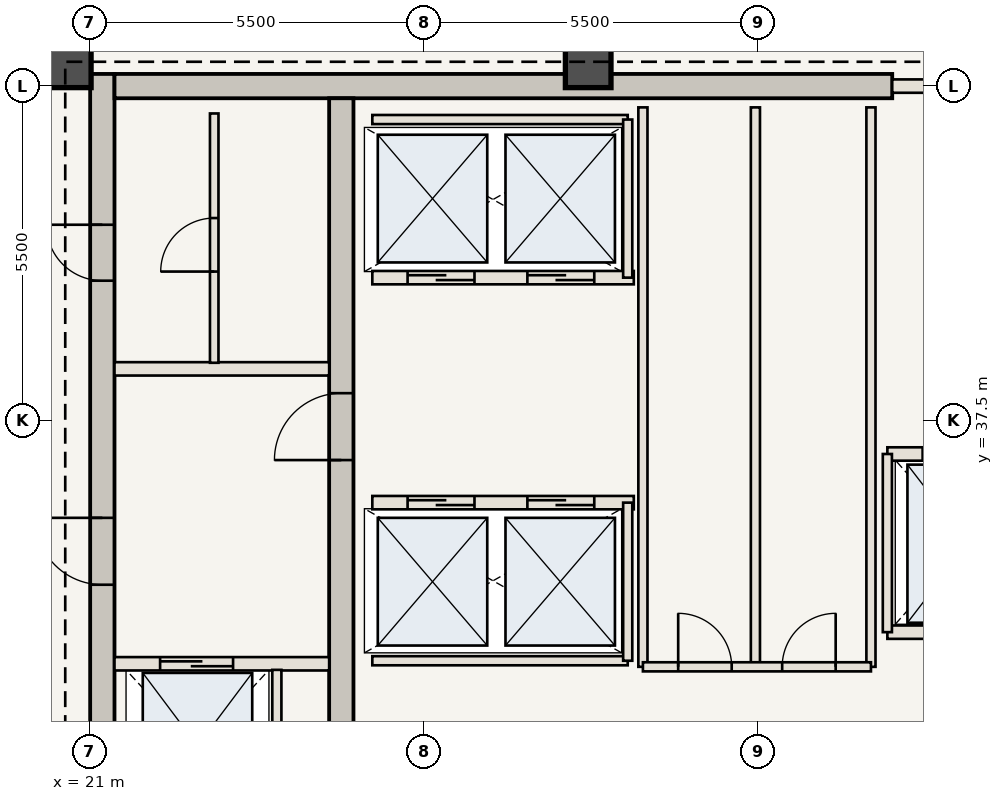
"""IFC4 building model, lengths in metres.
Left out: names, types, materials, properties, quantities, classifications, styles, units other than length and angle.
Written with IfcOpenShell. Run it as: python <this file> out.ifc"""

import sys

from ifc_helpers import new_model, si_unit, direction, frame, frame_2d, origin, origin_2d, place, context, subcontext, project, spatial, rectangle, extrude, element, fill, save


model = new_model("IFC4")
c1 = context("Model", 3, precision=1e-05, world=origin(), true_north=direction((0.0, 1.0)))
c2 = subcontext(c1, "Body", "Model", "MODEL_VIEW")
j1 = project(units=[si_unit("LENGTHUNIT", "METRE"), si_unit("PLANEANGLEUNIT", "RADIAN")], contexts=[c1])
p1 = place(None, origin())
s1 = spatial("IfcSite", under=j1, at=p1, CompositionType="ELEMENT")
p2 = place(p1, origin())
s2 = spatial("IfcBuilding", under=s1, at=p2, CompositionType="ELEMENT")
p3 = place(p2, frame((0.0, 0.0, 277.55)))
s3 = spatial("IfcBuildingStorey", under=s2, at=p3, CompositionType="ELEMENT", Elevation=277.55)
p4 = place(p3, frame((21.21, 30.6, 0.0), z_axis=(0.0, 0.0, 1.0), x_axis=(0.0, 1.0, 0.0)))
e1 = element("IfcWall", 1, at=p4, inside=s3, PredefinedType="SHEAR", context=c2, shape_type="SweptSolid", body=[
    extrude(rectangle(XDim=12.6, YDim=0.4, at=frame_2d((6.3, 0.0))), origin(), (0.0, 0.0, 1.0), 3.85),
])
p5 = place(p4, frame((4.2, 0.0, 0.0)))
e2 = element("IfcOpeningElement", 2, at=p5, cuts=e1, PredefinedType="OPENING", context=c2, shape_type="SweptSolid", body=[
    extrude(rectangle(XDim=1.1, YDim=2.15, at=frame_2d((0.55, 1.075))), frame((0.0, 0.21, 0.0), z_axis=(0.0, -1.0, 0.0), x_axis=(1.0, 0.0, 0.0)), (0.0, 0.0, 1.0), 0.42),
])
p6 = place(p4, frame((9.2, 0.0, 0.0)))
e3 = element("IfcOpeningElement", 3, at=p6, cuts=e1, PredefinedType="OPENING", context=c2, shape_type="SweptSolid", body=[
    extrude(rectangle(XDim=0.92, YDim=2.1, at=frame_2d((0.46, 1.05))), frame((0.0, 0.21, 0.0), z_axis=(0.0, -1.0, 0.0), x_axis=(1.0, 0.0, 0.0)), (0.0, 0.0, 1.0), 0.42),
])
p7 = place(p3, frame((21.41, 43.0, 0.0), z_axis=(0.0, 0.0, 1.0), x_axis=(1.0, 0.0, 0.0)))
e4 = element("IfcWall", 4, at=p7, inside=s3, PredefinedType="SHEAR", context=c2, shape_type="SweptSolid", body=[
    extrude(rectangle(XDim=12.79, YDim=0.4, at=frame_2d((6.395, 0.0))), origin(), (0.0, 0.0, 1.0), 3.85),
])
p8 = place(p3, frame((25.14, 30.6, 0.0), z_axis=(0.0, 0.0, 1.0), x_axis=(0.0, 1.0, 0.0)))
e5 = element("IfcWall", 5, at=p8, inside=s3, PredefinedType="SHEAR", context=c2, shape_type="SweptSolid", body=[
    extrude(rectangle(XDim=12.2, YDim=0.4, at=frame_2d((6.1, 0.0))), origin(), (0.0, 0.0, 1.0), 3.85),
])
p9 = place(p8, frame((6.25, 0.0, 0.0)))
e6 = element("IfcOpeningElement", 6, at=p9, cuts=e5, PredefinedType="OPENING", context=c2, shape_type="SweptSolid", body=[
    extrude(rectangle(XDim=1.1, YDim=2.15, at=frame_2d((0.55, 1.075))), frame((0.0, 0.21, 0.0), z_axis=(0.0, -1.0, 0.0), x_axis=(1.0, 0.0, 0.0)), (0.0, 0.0, 1.0), 0.42),
])
for number, where, z_axis, x_axis in (
    (7, (29.2, 43.35, 0.0), (0.0, 0.0, 1.0), (1.0, 0.0, 0.0)),
    (8, (20.65, 43.35, 0.0), (0.0, 0.0, 1.0), (1.0, 0.0, 0.0)),
):
    element("IfcColumn", number, at=place(p3, frame(where, z_axis=z_axis, x_axis=x_axis)), inside=s3, PredefinedType="COLUMN", context=c2, shape_type="SweptSolid", body=[
        extrude(rectangle(XDim=0.75, YDim=0.75, at=origin_2d()), origin(), (0.0, 0.0, 1.0), 3.85),
    ])
p10 = place(p3, frame((21.41, 33.5, 0.0), z_axis=(0.0, 0.0, 1.0), x_axis=(1.0, 0.0, 0.0)))
e9 = element("IfcWall", 9, at=p10, inside=s3, PredefinedType="STANDARD", context=c2, shape_type="SweptSolid", body=[
    extrude(rectangle(XDim=3.53, YDim=0.22, at=frame_2d((1.765, 0.0))), origin(), (0.0, 0.0, 1.0), 3.685),
])
p11 = place(p10, frame((0.75, 0.0, 0.0)))
e10 = element("IfcOpeningElement", 10, at=p11, cuts=e9, PredefinedType="OPENING", context=c2, shape_type="SweptSolid", body=[
    extrude(rectangle(XDim=1.2, YDim=2.2, at=frame_2d((0.6, 1.1))), frame((0.0, 0.12, 0.0), z_axis=(0.0, -1.0, 0.0), x_axis=(1.0, 0.0, 0.0)), (0.0, 0.0, 1.0), 0.24),
])
p12 = place(p3, frame((24.08, 30.75, 0.0), z_axis=(0.0, 0.0, 1.0), x_axis=(0.0, 1.0, 0.0)))
e11 = element("IfcWall", 11, at=p12, inside=s3, PredefinedType="STANDARD", context=c2, shape_type="SweptSolid", body=[
    extrude(rectangle(XDim=2.65, YDim=0.15, at=frame_2d((1.325, 0.0))), origin(), (0.0, 0.0, 1.0), 3.685),
])
p13 = place(p3, frame((21.41, 38.35, 0.0), z_axis=(0.0, 0.0, 1.0), x_axis=(1.0, 0.0, 0.0)))
e12 = element("IfcWall", 12, at=p13, inside=s3, PredefinedType="STANDARD", context=c2, shape_type="SweptSolid", body=[
    extrude(rectangle(XDim=3.53, YDim=0.22, at=frame_2d((1.765, 0.0))), origin(), (0.0, 0.0, 1.0), 3.685),
])
p14 = place(p3, frame((23.05, 38.45, 0.0), z_axis=(0.0, 0.0, 1.0), x_axis=(0.0, 1.0, 0.0)))
e13 = element("IfcWall", 13, at=p14, inside=s3, PredefinedType="STANDARD", context=c2, shape_type="SweptSolid", body=[
    extrude(rectangle(XDim=4.1, YDim=0.14, at=frame_2d((2.05, 0.0))), origin(), (0.0, 0.0, 1.0), 3.685),
])
p15 = place(p14, frame((1.5, 0.0, 0.0)))
e14 = element("IfcOpeningElement", 14, at=p15, cuts=e13, PredefinedType="OPENING", context=c2, shape_type="SweptSolid", body=[
    extrude(rectangle(XDim=0.88, YDim=2.1, at=frame_2d((0.44, 1.05))), frame((0.0, 0.08, 0.0), z_axis=(0.0, -1.0, 0.0), x_axis=(1.0, 0.0, 0.0)), (0.0, 0.0, 1.0), 0.16),
])
p16 = place(p3, frame((25.65, 36.15, 0.0), z_axis=(0.0, 0.0, 1.0), x_axis=(1.0, 0.0, 0.0)))
e15 = element("IfcWall", 15, at=p16, inside=s3, PredefinedType="STANDARD", context=c2, shape_type="SweptSolid", body=[
    extrude(rectangle(XDim=4.3, YDim=0.22, at=frame_2d((2.15, 0.0))), origin(), (0.0, 0.0, 1.0), 3.685),
])
p17 = place(p16, frame((0.58, 0.0, 0.0)))
e16 = element("IfcOpeningElement", 16, at=p17, cuts=e15, PredefinedType="OPENING", context=c2, shape_type="SweptSolid", body=[
    extrude(rectangle(XDim=1.1, YDim=2.15, at=frame_2d((0.55, 1.075))), frame((0.0, 0.12, 0.0), z_axis=(0.0, -1.0, 0.0), x_axis=(1.0, 0.0, 0.0)), (0.0, 0.0, 1.0), 0.24),
])
p18 = place(p16, frame((2.55, 0.0, 0.0)))
e17 = element("IfcOpeningElement", 17, at=p18, cuts=e15, PredefinedType="OPENING", context=c2, shape_type="SweptSolid", body=[
    extrude(rectangle(XDim=1.1, YDim=2.15, at=frame_2d((0.55, 1.075))), frame((0.0, 0.12, 0.0), z_axis=(0.0, -1.0, 0.0), x_axis=(1.0, 0.0, 0.0)), (0.0, 0.0, 1.0), 0.24),
])
p19 = place(p3, frame((25.65, 33.55, 0.0), z_axis=(0.0, 0.0, 1.0), x_axis=(1.0, 0.0, 0.0)))
e18 = element("IfcWall", 18, at=p19, inside=s3, PredefinedType="STANDARD", context=c2, shape_type="SweptSolid", body=[
    extrude(rectangle(XDim=4.2, YDim=0.15, at=frame_2d((2.1, 0.0))), origin(), (0.0, 0.0, 1.0), 3.685),
])
p20 = place(p3, frame((29.85, 33.55, 0.0), z_axis=(0.0, 0.0, 1.0), x_axis=(0.0, 1.0, 0.0)))
e19 = element("IfcWall", 19, at=p20, inside=s3, PredefinedType="STANDARD", context=c2, shape_type="SweptSolid", body=[
    extrude(rectangle(XDim=2.6, YDim=0.15, at=frame_2d((1.3, 0.0))), origin(), (0.0, 0.0, 1.0), 3.685),
])
p21 = place(p3, frame((25.65, 39.85, 0.0), z_axis=(0.0, 0.0, 1.0), x_axis=(1.0, 0.0, 0.0)))
e20 = element("IfcWall", 20, at=p21, inside=s3, PredefinedType="STANDARD", context=c2, shape_type="SweptSolid", body=[
    extrude(rectangle(XDim=4.3, YDim=0.22, at=frame_2d((2.15, 0.0))), origin(), (0.0, 0.0, 1.0), 3.685),
])
p22 = place(p21, frame((0.58, 0.0, 0.0)))
e21 = element("IfcOpeningElement", 21, at=p22, cuts=e20, PredefinedType="OPENING", context=c2, shape_type="SweptSolid", body=[
    extrude(rectangle(XDim=1.1, YDim=2.15, at=frame_2d((0.55, 1.075))), frame((0.0, 0.12, 0.0), z_axis=(0.0, -1.0, 0.0), x_axis=(1.0, 0.0, 0.0)), (0.0, 0.0, 1.0), 0.24),
])
p23 = place(p21, frame((2.55, 0.0, 0.0)))
e22 = element("IfcOpeningElement", 22, at=p23, cuts=e20, PredefinedType="OPENING", context=c2, shape_type="SweptSolid", body=[
    extrude(rectangle(XDim=1.1, YDim=2.15, at=frame_2d((0.55, 1.075))), frame((0.0, 0.12, 0.0), z_axis=(0.0, -1.0, 0.0), x_axis=(1.0, 0.0, 0.0)), (0.0, 0.0, 1.0), 0.24),
])
p24 = place(p3, frame((25.65, 42.45, 0.0), z_axis=(0.0, 0.0, 1.0), x_axis=(1.0, 0.0, 0.0)))
e23 = element("IfcWall", 23, at=p24, inside=s3, PredefinedType="STANDARD", context=c2, shape_type="SweptSolid", body=[
    extrude(rectangle(XDim=4.2, YDim=0.15, at=frame_2d((2.1, 0.0))), origin(), (0.0, 0.0, 1.0), 3.685),
])
p25 = place(p3, frame((29.85, 39.85, 0.0), z_axis=(0.0, 0.0, 1.0), x_axis=(0.0, 1.0, 0.0)))
e24 = element("IfcWall", 24, at=p25, inside=s3, PredefinedType="STANDARD", context=c2, shape_type="SweptSolid", body=[
    extrude(rectangle(XDim=2.6, YDim=0.15, at=frame_2d((1.3, 0.0))), origin(), (0.0, 0.0, 1.0), 3.685),
])
for number, where, z_axis, x_axis in (
    (25, (30.1, 33.45, 0.0), (0.0, 0.0, 1.0), (0.0, 1.0, 0.0)),
    (26, (31.95, 33.45, 0.0), (0.0, 0.0, 1.0), (0.0, 1.0, 0.0)),
    (27, (33.85, 33.45, 0.0), (0.0, 0.0, 1.0), (0.0, 1.0, 0.0)),
):
    element("IfcWall", number, at=place(p3, frame(where, z_axis=z_axis, x_axis=x_axis)), inside=s3, PredefinedType="STANDARD", context=c2, shape_type="SweptSolid", body=[
        extrude(rectangle(XDim=9.2, YDim=0.15, at=frame_2d((4.6, 0.0))), origin(), (0.0, 0.0, 1.0), 3.685),
    ])
p26 = place(p3, frame((30.1, 33.45, 0.0), z_axis=(0.0, 0.0, 1.0), x_axis=(1.0, 0.0, 0.0)))
e28 = element("IfcWall", 28, at=p26, inside=s3, PredefinedType="STANDARD", context=c2, shape_type="SweptSolid", body=[
    extrude(rectangle(XDim=3.75, YDim=0.15, at=frame_2d((1.875, 0.0))), origin(), (0.0, 0.0, 1.0), 3.685),
])
p27 = place(p26, frame((0.58, 0.0, 0.0)))
e29 = element("IfcOpeningElement", 29, at=p27, cuts=e28, PredefinedType="OPENING", context=c2, shape_type="SweptSolid", body=[
    extrude(rectangle(XDim=0.88, YDim=2.1, at=frame_2d((0.44, 1.05))), frame((0.0, 0.085, 0.0), z_axis=(0.0, -1.0, 0.0), x_axis=(1.0, 0.0, 0.0)), (0.0, 0.0, 1.0), 0.17),
])
p28 = place(p26, frame((2.29, 0.0, 0.0)))
e30 = element("IfcOpeningElement", 30, at=p28, cuts=e28, PredefinedType="OPENING", context=c2, shape_type="SweptSolid", body=[
    extrude(rectangle(XDim=0.88, YDim=2.1, at=frame_2d((0.44, 1.05))), frame((0.0, 0.085, 0.0), z_axis=(0.0, -1.0, 0.0), x_axis=(1.0, 0.0, 0.0)), (0.0, 0.0, 1.0), 0.17),
])
p29 = place(p3, frame((34.2, 43.0, 0.0), z_axis=(0.0, 0.0, 1.0), x_axis=(1.0, 0.0, 0.0)))
e31 = element("IfcWall", 31, at=p29, inside=s3, PredefinedType="STANDARD", context=c2, shape_type="SweptSolid", body=[
    extrude(rectangle(XDim=3.55, YDim=0.22, at=frame_2d((1.775, 0.0))), origin(), (0.0, 0.0, 1.0), 3.685),
])
p30 = place(p29, frame((1.4, 0.0, 0.0)))
e32 = element("IfcOpeningElement", 32, at=p30, cuts=e31, PredefinedType="OPENING", context=c2, shape_type="SweptSolid", body=[
    extrude(rectangle(XDim=1.1, YDim=2.15, at=frame_2d((0.55, 1.075))), frame((0.0, 0.12, 0.0), z_axis=(0.0, -1.0, 0.0), x_axis=(1.0, 0.0, 0.0)), (0.0, 0.0, 1.0), 0.24),
])
p31 = place(p3, frame((34.12, 36.95, 0.0), z_axis=(0.0, 0.0, 1.0), x_axis=(1.0, 0.0, 0.0)))
e33 = element("IfcWall", 33, at=p31, inside=s3, PredefinedType="STANDARD", context=c2, shape_type="SweptSolid", body=[
    extrude(rectangle(XDim=2.68, YDim=0.22, at=frame_2d((1.34, 0.0))), origin(), (0.0, 0.0, 1.0), 3.685),
])
p32 = place(p31, frame((0.58, 0.0, 0.0)))
e34 = element("IfcOpeningElement", 34, at=p32, cuts=e33, PredefinedType="OPENING", context=c2, shape_type="SweptSolid", body=[
    extrude(rectangle(XDim=1.2, YDim=2.2, at=frame_2d((0.6, 1.1))), frame((0.0, 0.12, 0.0), z_axis=(0.0, -1.0, 0.0), x_axis=(1.0, 0.0, 0.0)), (0.0, 0.0, 1.0), 0.24),
])
p33 = place(p3, frame((34.12, 34.02, 0.0), z_axis=(0.0, 0.0, 1.0), x_axis=(1.0, 0.0, 0.0)))
e35 = element("IfcWall", 35, at=p33, inside=s3, PredefinedType="STANDARD", context=c2, shape_type="SweptSolid", body=[
    extrude(rectangle(XDim=2.68, YDim=0.22, at=frame_2d((1.34, 0.0))), origin(), (0.0, 0.0, 1.0), 3.685),
])
p34 = place(p3, frame((34.12, 34.02, 0.0), z_axis=(0.0, 0.0, 1.0), x_axis=(0.0, 1.0, 0.0)))
e36 = element("IfcWall", 36, at=p34, inside=s3, PredefinedType="STANDARD", context=c2, shape_type="SweptSolid", body=[
    extrude(rectangle(XDim=2.93, YDim=0.15, at=frame_2d((1.465, 0.0))), origin(), (0.0, 0.0, 1.0), 3.685),
])
p35 = place(p5, origin())
e37 = element("IfcDoor", 37, at=p35, inside=s3, OperationType="SINGLE_SWING_RIGHT", PredefinedType="DOOR", context=c2, shape_type="SweptSolid", body=[
    extrude(rectangle(XDim=1.1, YDim=2.15, at=frame_2d((0.55, 1.075))), frame((0.0, 0.025, 0.0), z_axis=(0.0, -1.0, 0.0), x_axis=(1.0, 0.0, 0.0)), (0.0, 0.0, 1.0), 0.05),
])
fill(e2, e37)
p36 = place(p9, origin())
e38 = element("IfcDoor", 38, at=p36, inside=s3, OperationType="SINGLE_SWING_LEFT", PredefinedType="DOOR", context=c2, shape_type="SweptSolid", body=[
    extrude(rectangle(XDim=1.1, YDim=2.15, at=frame_2d((0.55, 1.075))), frame((0.0, 0.025, 0.0), z_axis=(0.0, -1.0, 0.0), x_axis=(1.0, 0.0, 0.0)), (0.0, 0.0, 1.0), 0.05),
])
fill(e6, e38)
p37 = place(p6, origin())
e39 = element("IfcDoor", 39, at=p37, inside=s3, OperationType="SINGLE_SWING_RIGHT", PredefinedType="DOOR", context=c2, shape_type="SweptSolid", body=[
    extrude(rectangle(XDim=0.92, YDim=2.1, at=frame_2d((0.46, 1.05))), frame((0.0, 0.025, 0.0), z_axis=(0.0, -1.0, 0.0), x_axis=(1.0, 0.0, 0.0)), (0.0, 0.0, 1.0), 0.05),
])
fill(e3, e39)
p38 = place(p11, origin())
e40 = element("IfcDoor", 40, at=p38, inside=s3, OperationType="DOUBLE_DOOR_SLIDING", PredefinedType="DOOR", context=c2, shape_type="SweptSolid", body=[
    extrude(rectangle(XDim=1.2, YDim=2.2, at=frame_2d((0.6, 1.1))), frame((0.0, 0.025, 0.0), z_axis=(0.0, -1.0, 0.0), x_axis=(1.0, 0.0, 0.0)), (0.0, 0.0, 1.0), 0.05),
])
fill(e10, e40)
p39 = place(p15, origin())
e41 = element("IfcDoor", 41, at=p39, inside=s3, OperationType="SINGLE_SWING_LEFT", PredefinedType="DOOR", context=c2, shape_type="SweptSolid", body=[
    extrude(rectangle(XDim=0.88, YDim=2.1, at=frame_2d((0.44, 1.05))), frame((0.0, 0.025, 0.0), z_axis=(0.0, -1.0, 0.0), x_axis=(1.0, 0.0, 0.0)), (0.0, 0.0, 1.0), 0.05),
])
fill(e14, e41)
p40 = place(p17, origin())
e42 = element("IfcDoor", 42, at=p40, inside=s3, OperationType="DOUBLE_DOOR_SLIDING", PredefinedType="DOOR", context=c2, shape_type="SweptSolid", body=[
    extrude(rectangle(XDim=1.1, YDim=2.15, at=frame_2d((0.55, 1.075))), frame((0.0, 0.025, 0.0), z_axis=(0.0, -1.0, 0.0), x_axis=(1.0, 0.0, 0.0)), (0.0, 0.0, 1.0), 0.05),
])
fill(e16, e42)
p41 = place(p18, origin())
e43 = element("IfcDoor", 43, at=p41, inside=s3, OperationType="DOUBLE_DOOR_SLIDING", PredefinedType="DOOR", context=c2, shape_type="SweptSolid", body=[
    extrude(rectangle(XDim=1.1, YDim=2.15, at=frame_2d((0.55, 1.075))), frame((0.0, 0.025, 0.0), z_axis=(0.0, -1.0, 0.0), x_axis=(1.0, 0.0, 0.0)), (0.0, 0.0, 1.0), 0.05),
])
fill(e17, e43)
p42 = place(p22, origin())
e44 = element("IfcDoor", 44, at=p42, inside=s3, OperationType="DOUBLE_DOOR_SLIDING", PredefinedType="DOOR", context=c2, shape_type="SweptSolid", body=[
    extrude(rectangle(XDim=1.1, YDim=2.15, at=frame_2d((0.55, 1.075))), frame((0.0, 0.025, 0.0), z_axis=(0.0, -1.0, 0.0), x_axis=(1.0, 0.0, 0.0)), (0.0, 0.0, 1.0), 0.05),
])
fill(e21, e44)
p43 = place(p23, origin())
e45 = element("IfcDoor", 45, at=p43, inside=s3, OperationType="DOUBLE_DOOR_SLIDING", PredefinedType="DOOR", context=c2, shape_type="SweptSolid", body=[
    extrude(rectangle(XDim=1.1, YDim=2.15, at=frame_2d((0.55, 1.075))), frame((0.0, 0.025, 0.0), z_axis=(0.0, -1.0, 0.0), x_axis=(1.0, 0.0, 0.0)), (0.0, 0.0, 1.0), 0.05),
])
fill(e22, e45)
p44 = place(p27, origin())
e46 = element("IfcDoor", 46, at=p44, inside=s3, OperationType="SINGLE_SWING_LEFT", PredefinedType="DOOR", context=c2, shape_type="SweptSolid", body=[
    extrude(rectangle(XDim=0.88, YDim=2.1, at=frame_2d((0.44, 1.05))), frame((0.0, 0.025, 0.0), z_axis=(0.0, -1.0, 0.0), x_axis=(1.0, 0.0, 0.0)), (0.0, 0.0, 1.0), 0.05),
])
fill(e29, e46)
p45 = place(p28, origin())
e47 = element("IfcDoor", 47, at=p45, inside=s3, OperationType="SINGLE_SWING_RIGHT", PredefinedType="DOOR", context=c2, shape_type="SweptSolid", body=[
    extrude(rectangle(XDim=0.88, YDim=2.1, at=frame_2d((0.44, 1.05))), frame((0.0, 0.025, 0.0), z_axis=(0.0, -1.0, 0.0), x_axis=(1.0, 0.0, 0.0)), (0.0, 0.0, 1.0), 0.05),
])
fill(e30, e47)
p46 = place(p32, origin())
e48 = element("IfcDoor", 48, at=p46, inside=s3, OperationType="DOUBLE_DOOR_SLIDING", PredefinedType="DOOR", context=c2, shape_type="SweptSolid", body=[
    extrude(rectangle(XDim=1.2, YDim=2.2, at=frame_2d((0.6, 1.1))), frame((0.0, 0.025, 0.0), z_axis=(0.0, -1.0, 0.0), x_axis=(1.0, 0.0, 0.0)), (0.0, 0.0, 1.0), 0.05),
])
fill(e34, e48)
save(model, sys.argv[1])
